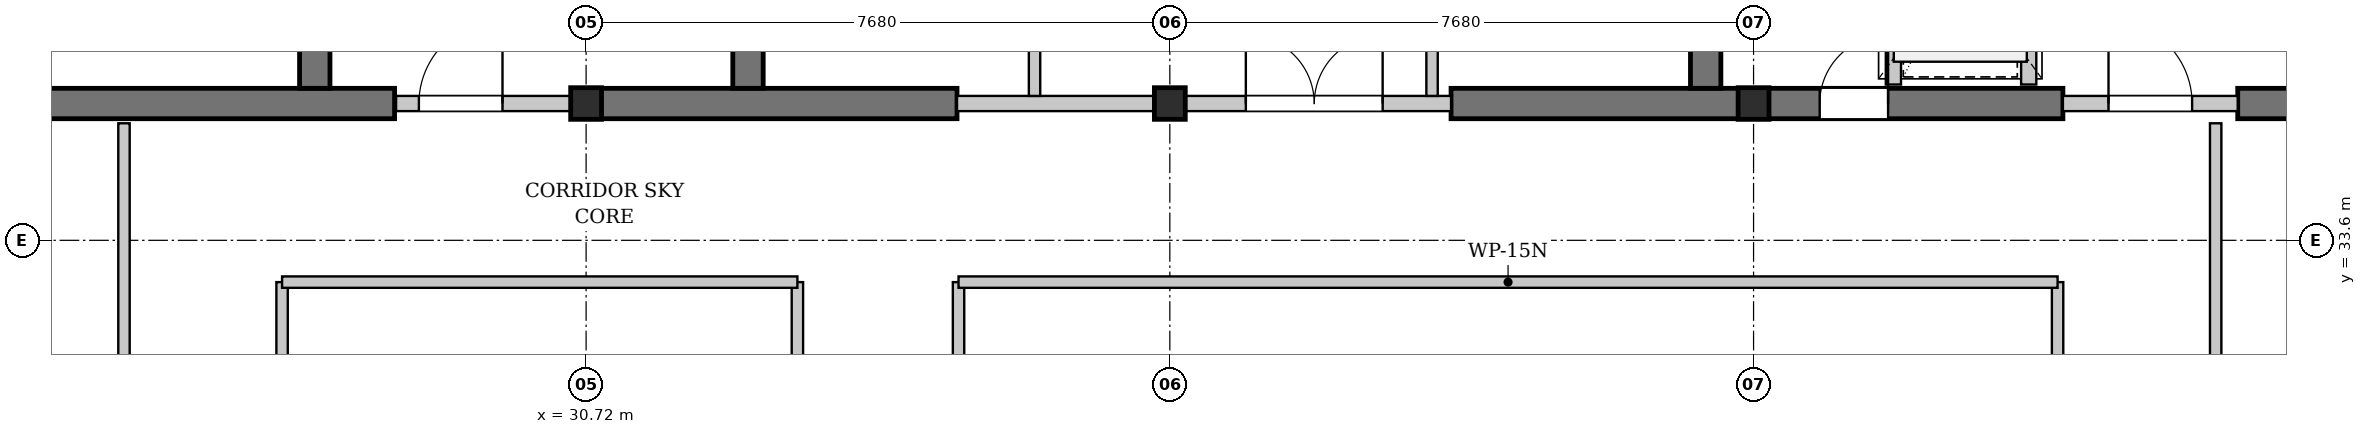
"""IFC4 building model, lengths in metres.
Left out: names, types, materials, properties, quantities, classifications, styles, units other than length and angle.
Written with IfcOpenShell. Run it as: python <this file> out.ifc"""

import sys

from ifc_helpers import new_model, si_unit, direction, frame, frame_2d, origin, origin_2d, place, context, subcontext, project, spatial, rectangle, i_section, extrude, element, fill, save


model = new_model("IFC4")
c1 = context("Model", 3, precision=1e-05, world=origin(), true_north=direction((0.0, 1.0)))
c2 = subcontext(c1, "Body", "Model", "MODEL_VIEW")
j1 = project(units=[si_unit("LENGTHUNIT", "METRE"), si_unit("PLANEANGLEUNIT", "RADIAN")], contexts=[c1])
p1 = place(None, origin())
s1 = spatial("IfcSite", under=j1, at=p1, CompositionType="ELEMENT")
p2 = place(p1, origin())
s2 = spatial("IfcBuilding", under=s1, at=p2, CompositionType="ELEMENT")
p3 = place(p2, frame((0.0, 0.0, 276.1)))
s3 = spatial("IfcBuildingStorey", under=s2, at=p3, CompositionType="ELEMENT", Elevation=276.1)
p4 = place(p3, frame((22.84, 35.4, 0.0), z_axis=(0.0, 0.0, 1.0), x_axis=(1.0, 0.0, 0.0)))
e1 = element("IfcWall", 1, at=p4, inside=s3, PredefinedType="SHEAR", context=c2, shape_type="SweptSolid", body=[
    extrude(rectangle(XDim=5.36, YDim=0.4, at=frame_2d((2.68, 0.0))), origin(), (0.0, 0.0, 1.0), 3.18),
])
p5 = place(p3, frame((30.72, 35.4, 0.0), z_axis=(0.0, 0.0, 1.0), x_axis=(1.0, 0.0, 0.0)))
e2 = element("IfcWall", 2, at=p5, inside=s3, PredefinedType="SHEAR", context=c2, shape_type="SweptSolid", body=[
    extrude(rectangle(XDim=4.88, YDim=0.4, at=frame_2d((2.44, 0.0))), origin(), (0.0, 0.0, 1.0), 3.18),
])
p6 = place(p3, frame((42.1, 35.4, 0.0), z_axis=(0.0, 0.0, 1.0), x_axis=(1.0, 0.0, 0.0)))
e3 = element("IfcWall", 3, at=p6, inside=s3, PredefinedType="SHEAR", context=c2, shape_type="SweptSolid", body=[
    extrude(rectangle(XDim=8.05, YDim=0.4, at=frame_2d((4.025, 0.0))), origin(), (0.0, 0.0, 1.0), 3.18),
])
p7 = place(p6, frame((4.85, 0.0, 0.0)))
e4 = element("IfcOpeningElement", 4, at=p7, cuts=e3, PredefinedType="OPENING", context=c2, shape_type="SweptSolid", body=[
    extrude(rectangle(XDim=0.9, YDim=2.15, at=frame_2d((0.45, 1.075))), frame((0.0, 0.21, 0.0), z_axis=(0.0, -1.0, 0.0), x_axis=(1.0, 0.0, 0.0)), (0.0, 0.0, 1.0), 0.42),
])
p8 = place(p3, frame((52.45, 35.4, 0.0), z_axis=(0.0, 0.0, 1.0), x_axis=(1.0, 0.0, 0.0)))
e5 = element("IfcWall", 5, at=p8, inside=s3, PredefinedType="SHEAR", context=c2, shape_type="SweptSolid", body=[
    extrude(rectangle(XDim=1.51, YDim=0.4, at=frame_2d((0.755, 0.0))), origin(), (0.0, 0.0, 1.0), 3.18),
])
p9 = place(p3, frame((27.15, 35.6, 0.0), z_axis=(0.0, 0.0, 1.0), x_axis=(0.0, 1.0, 0.0)))
e6 = element("IfcWall", 6, at=p9, inside=s3, PredefinedType="SHEAR", context=c2, shape_type="SweptSolid", body=[
    extrude(rectangle(XDim=10.4, YDim=0.4, at=frame_2d((5.2, 0.0))), origin(), (0.0, 0.0, 1.0), 3.18),
])
p10 = place(p9, frame((0.7, 0.0, 0.0)))
e7 = element("IfcOpeningElement", 7, at=p10, cuts=e6, PredefinedType="OPENING", context=c2, shape_type="SweptSolid", body=[
    extrude(rectangle(XDim=1.1, YDim=2.15, at=frame_2d((0.55, 1.075))), frame((0.0, 0.21, 0.0), z_axis=(0.0, -1.0, 0.0), x_axis=(1.0, 0.0, 0.0)), (0.0, 0.0, 1.0), 0.42),
])
for number, where, z_axis, x_axis in (
    (8, (32.85, 35.6, 0.0), (0.0, 0.0, 1.0), (0.0, 1.0, 0.0)),
    (9, (45.45, 35.6, 0.0), (0.0, 0.0, 1.0), (0.0, 1.0, 0.0)),
):
    element("IfcWall", number, at=place(p3, frame(where, z_axis=z_axis, x_axis=x_axis)), inside=s3, PredefinedType="SHEAR", context=c2, shape_type="SweptSolid", body=[
        extrude(rectangle(XDim=10.4, YDim=0.4, at=frame_2d((5.2, 0.0))), origin(), (0.0, 0.0, 1.0), 3.18),
    ])
for number, where, z_axis, x_axis in (
    (10, (30.72, 35.4, 0.0), (0.0, 0.0, 1.0), (1.0, 0.0, 0.0)),
    (11, (38.4, 35.4, 0.0), (0.0, 0.0, 1.0), (1.0, 0.0, 0.0)),
    (12, (46.08, 35.4, 0.0), (0.0, 0.0, 1.0), (1.0, 0.0, 0.0)),
):
    element("IfcColumn", number, at=place(p3, frame(where, z_axis=z_axis, x_axis=x_axis)), inside=s3, PredefinedType="COLUMN", context=c2, shape_type="SweptSolid", body=[
        extrude(i_section(OverallWidth=0.406, OverallDepth=0.416, WebThickness=0.03, FlangeThickness=0.048, FilletRadius=0.015, at=origin_2d()), origin(), (0.0, 0.0, 1.0), 3.4),
    ])
p11 = place(p3, frame((28.22, 35.4, 0.0), z_axis=(0.0, 0.0, 1.0), x_axis=(1.0, 0.0, 0.0)))
e13 = element("IfcWall", 13, at=p11, inside=s3, PredefinedType="PARTITIONING", context=c2, shape_type="SweptSolid", body=[
    extrude(rectangle(XDim=2.5, YDim=0.2, at=frame_2d((1.25, 0.0))), origin(), (0.0, 0.0, 1.0), 2.575),
])
p12 = place(p11, frame((0.3, 0.0, 0.0)))
e14 = element("IfcOpeningElement", 14, at=p12, cuts=e13, PredefinedType="OPENING", context=c2, shape_type="SweptSolid", body=[
    extrude(rectangle(XDim=1.1, YDim=2.15, at=frame_2d((0.55, 1.075))), frame((0.0, 0.11, 0.0), z_axis=(0.0, -1.0, 0.0), x_axis=(1.0, 0.0, 0.0)), (0.0, 0.0, 1.0), 0.22),
])
p13 = place(p3, frame((35.6, 35.4, 0.0), z_axis=(0.0, 0.0, 1.0), x_axis=(1.0, 0.0, 0.0)))
e15 = element("IfcWall", 15, at=p13, inside=s3, PredefinedType="PARTITIONING", context=c2, shape_type="SweptSolid", body=[
    extrude(rectangle(XDim=6.5, YDim=0.2, at=frame_2d((3.25, 0.0))), origin(), (0.0, 0.0, 1.0), 2.575),
])
p14 = place(p13, frame((3.8, 0.0, 0.0)))
e16 = element("IfcOpeningElement", 16, at=p14, cuts=e15, PredefinedType="OPENING", context=c2, shape_type="SweptSolid", body=[
    extrude(rectangle(XDim=1.8, YDim=2.3, at=frame_2d((0.9, 1.15))), frame((0.0, 0.11, 0.0), z_axis=(0.0, -1.0, 0.0), x_axis=(1.0, 0.0, 0.0)), (0.0, 0.0, 1.0), 0.22),
])
p15 = place(p3, frame((36.62, 35.5, 0.0), z_axis=(0.0, 0.0, 1.0), x_axis=(0.0, 1.0, 0.0)))
e17 = element("IfcWall", 17, at=p15, inside=s3, PredefinedType="PARTITIONING", context=c2, shape_type="SweptSolid", body=[
    extrude(rectangle(XDim=10.42, YDim=0.15, at=frame_2d((5.21, 0.0))), origin(), (0.0, 0.0, 1.0), 3.18),
])
p16 = place(p15, frame((3.92, 0.0, 0.0)))
e18 = element("IfcOpeningElement", 18, at=p16, cuts=e17, PredefinedType="OPENING", context=c2, shape_type="SweptSolid", body=[
    extrude(rectangle(XDim=0.9, YDim=2.15, at=frame_2d((0.45, 1.075))), frame((0.0, 0.085, 0.0), z_axis=(0.0, -1.0, 0.0), x_axis=(1.0, 0.0, 0.0)), (0.0, 0.0, 1.0), 0.17),
])
p17 = place(p15, frame((5.85, 0.0, 0.0)))
e19 = element("IfcOpeningElement", 19, at=p17, cuts=e17, PredefinedType="OPENING", context=c2, shape_type="SweptSolid", body=[
    extrude(rectangle(XDim=0.9, YDim=2.15, at=frame_2d((0.45, 1.075))), frame((0.0, 0.085, 0.0), z_axis=(0.0, -1.0, 0.0), x_axis=(1.0, 0.0, 0.0)), (0.0, 0.0, 1.0), 0.17),
])
p18 = place(p3, frame((41.85, 35.5, 0.0), z_axis=(0.0, 0.0, 1.0), x_axis=(0.0, 1.0, 0.0)))
e20 = element("IfcWall", 20, at=p18, inside=s3, PredefinedType="PARTITIONING", context=c2, shape_type="SweptSolid", body=[
    extrude(rectangle(XDim=10.42, YDim=0.15, at=frame_2d((5.21, 0.0))), origin(), (0.0, 0.0, 1.0), 3.18),
])
p19 = place(p18, frame((3.92, 0.0, 0.0)))
e21 = element("IfcOpeningElement", 21, at=p19, cuts=e20, PredefinedType="OPENING", context=c2, shape_type="SweptSolid", body=[
    extrude(rectangle(XDim=0.9, YDim=2.15, at=frame_2d((0.45, 1.075))), frame((0.0, 0.085, 0.0), z_axis=(0.0, -1.0, 0.0), x_axis=(1.0, 0.0, 0.0)), (0.0, 0.0, 1.0), 0.17),
])
p20 = place(p18, frame((5.85, 0.0, 0.0)))
e22 = element("IfcOpeningElement", 22, at=p20, cuts=e20, PredefinedType="OPENING", context=c2, shape_type="SweptSolid", body=[
    extrude(rectangle(XDim=0.9, YDim=2.15, at=frame_2d((0.45, 1.075))), frame((0.0, 0.085, 0.0), z_axis=(0.0, -1.0, 0.0), x_axis=(1.0, 0.0, 0.0)), (0.0, 0.0, 1.0), 0.17),
])
p21 = place(p3, frame((50.15, 35.4, 0.0), z_axis=(0.0, 0.0, 1.0), x_axis=(1.0, 0.0, 0.0)))
e23 = element("IfcWall", 23, at=p21, inside=s3, PredefinedType="PARTITIONING", context=c2, shape_type="SweptSolid", body=[
    extrude(rectangle(XDim=2.3, YDim=0.2, at=frame_2d((1.15, 0.0))), origin(), (0.0, 0.0, 1.0), 2.575),
])
p22 = place(p21, frame((0.6, 0.0, 0.0)))
e24 = element("IfcOpeningElement", 24, at=p22, cuts=e23, PredefinedType="OPENING", context=c2, shape_type="SweptSolid", body=[
    extrude(rectangle(XDim=1.1, YDim=2.15, at=frame_2d((0.55, 1.075))), frame((0.0, 0.11, 0.0), z_axis=(0.0, -1.0, 0.0), x_axis=(1.0, 0.0, 0.0)), (0.0, 0.0, 1.0), 0.22),
])
p23 = place(p3, frame((49.7, 35.65, 0.0), z_axis=(0.0, 0.0, 1.0), x_axis=(0.0, 1.0, 0.0)))
e25 = element("IfcWall", 25, at=p23, inside=s3, PredefinedType="PARTITIONING", context=c2, shape_type="SweptSolid", body=[
    extrude(rectangle(XDim=3.15, YDim=0.2, at=frame_2d((1.575, 0.0))), origin(), (0.0, 0.0, 1.0), 3.18),
])
p24 = place(p23, frame((0.85, 0.0, 0.0)))
e26 = element("IfcOpeningElement", 26, at=p24, cuts=e25, PredefinedType="OPENING", context=c2, shape_type="SweptSolid", body=[
    extrude(rectangle(XDim=1.2, YDim=2.2, at=frame_2d((0.6, 1.1))), frame((0.0, 0.11, 0.0), z_axis=(0.0, -1.0, 0.0), x_axis=(1.0, 0.0, 0.0)), (0.0, 0.0, 1.0), 0.22),
])
p25 = place(p3, frame((47.92, 35.65, 0.0), z_axis=(0.0, 0.0, 1.0), x_axis=(0.0, 1.0, 0.0)))
e27 = element("IfcWall", 27, at=p25, inside=s3, PredefinedType="PARTITIONING", context=c2, shape_type="SweptSolid", body=[
    extrude(rectangle(XDim=3.15, YDim=0.2, at=frame_2d((1.575, 0.0))), origin(), (0.0, 0.0, 1.0), 3.18),
])
p26 = place(p3, frame((24.64, 21.85, 0.0), z_axis=(0.0, 0.0, 1.0), x_axis=(0.0, 1.0, 0.0)))
e28 = element("IfcWall", 28, at=p26, inside=s3, PredefinedType="PARTITIONING", context=c2, shape_type="SweptSolid", body=[
    extrude(rectangle(XDim=13.29, YDim=0.15, at=frame_2d((6.645, 0.0))), origin(), (0.0, 0.0, 1.0), 3.18),
])
p27 = place(p26, frame((0.984, 0.0, 0.0)))
e29 = element("IfcOpeningElement", 29, at=p27, cuts=e28, PredefinedType="OPENING", context=c2, shape_type="SweptSolid", body=[
    extrude(rectangle(XDim=0.9, YDim=2.15, at=frame_2d((0.45, 1.075))), frame((0.0, 0.085, 0.0), z_axis=(0.0, -1.0, 0.0), x_axis=(1.0, 0.0, 0.0)), (0.0, 0.0, 1.0), 0.17),
])
p28 = place(p3, frame((52.16, 21.85, 0.0), z_axis=(0.0, 0.0, 1.0), x_axis=(0.0, 1.0, 0.0)))
e30 = element("IfcWall", 30, at=p28, inside=s3, PredefinedType="PARTITIONING", context=c2, shape_type="SweptSolid", body=[
    extrude(rectangle(XDim=13.29, YDim=0.15, at=frame_2d((6.645, 0.0))), origin(), (0.0, 0.0, 1.0), 3.18),
])
p29 = place(p28, frame((0.984, 0.0, 0.0)))
e31 = element("IfcOpeningElement", 31, at=p29, cuts=e30, PredefinedType="OPENING", context=c2, shape_type="SweptSolid", body=[
    extrude(rectangle(XDim=0.9, YDim=2.15, at=frame_2d((0.45, 1.075))), frame((0.0, 0.085, 0.0), z_axis=(0.0, -1.0, 0.0), x_axis=(1.0, 0.0, 0.0)), (0.0, 0.0, 1.0), 0.17),
])
for number, where, z_axis, x_axis in (
    (32, (26.72, 23.93, 0.0), (0.0, 0.0, 1.0), (0.0, 1.0, 0.0)),
    (33, (50.08, 23.93, 0.0), (0.0, 0.0, 1.0), (0.0, 1.0, 0.0)),
    (34, (33.5, 23.93, 0.0), (0.0, 0.0, 1.0), (0.0, 1.0, 0.0)),
    (35, (35.62, 23.93, 0.0), (0.0, 0.0, 1.0), (0.0, 1.0, 0.0)),
):
    element("IfcWall", number, at=place(p3, frame(where, z_axis=z_axis, x_axis=x_axis)), inside=s3, PredefinedType="PARTITIONING", context=c2, shape_type="SweptSolid", body=[
        extrude(rectangle(XDim=9.12, YDim=0.15, at=frame_2d((4.56, 0.0))), origin(), (0.0, 0.0, 1.0), 3.18),
    ])
p30 = place(p3, frame((26.72, 33.05, 0.0), z_axis=(0.0, 0.0, 1.0), x_axis=(1.0, 0.0, 0.0)))
e36 = element("IfcWall", 36, at=p30, inside=s3, PredefinedType="PARTITIONING", context=c2, shape_type="SweptSolid", body=[
    extrude(rectangle(XDim=6.78, YDim=0.15, at=frame_2d((3.39, 0.0))), origin(), (0.0, 0.0, 1.0), 3.18),
])
p31 = place(p3, frame((35.62, 33.05, 0.0), z_axis=(0.0, 0.0, 1.0), x_axis=(1.0, 0.0, 0.0)))
e37 = element("IfcWall", 37, at=p31, inside=s3, PredefinedType="PARTITIONING", context=c2, shape_type="SweptSolid", body=[
    extrude(rectangle(XDim=14.46, YDim=0.15, at=frame_2d((7.23, 0.0))), origin(), (0.0, 0.0, 1.0), 3.18),
])
p32 = place(p12, origin())
e38 = element("IfcDoor", 38, at=p32, inside=s3, OperationType="SINGLE_SWING_RIGHT", PredefinedType="DOOR", context=c2, shape_type="SweptSolid", body=[
    extrude(rectangle(XDim=1.1, YDim=2.15, at=frame_2d((0.55, 1.075))), frame((0.0, 0.025, 0.0), z_axis=(0.0, -1.0, 0.0), x_axis=(1.0, 0.0, 0.0)), (0.0, 0.0, 1.0), 0.05),
])
fill(e14, e38)
p33 = place(p14, origin())
e39 = element("IfcDoor", 39, at=p33, inside=s3, OperationType="DOUBLE_DOOR_SINGLE_SWING", PredefinedType="DOOR", context=c2, shape_type="SweptSolid", body=[
    extrude(rectangle(XDim=1.8, YDim=2.3, at=frame_2d((0.9, 1.15))), frame((0.0, 0.025, 0.0), z_axis=(0.0, -1.0, 0.0), x_axis=(1.0, 0.0, 0.0)), (0.0, 0.0, 1.0), 0.05),
])
fill(e16, e39)
p34 = place(p22, origin())
e40 = element("IfcDoor", 40, at=p34, inside=s3, OperationType="SINGLE_SWING_LEFT", PredefinedType="DOOR", context=c2, shape_type="SweptSolid", body=[
    extrude(rectangle(XDim=1.1, YDim=2.15, at=frame_2d((0.55, 1.075))), frame((0.0, 0.025, 0.0), z_axis=(0.0, -1.0, 0.0), x_axis=(1.0, 0.0, 0.0)), (0.0, 0.0, 1.0), 0.05),
])
fill(e24, e40)
p35 = place(p7, origin())
e41 = element("IfcDoor", 41, at=p35, inside=s3, OperationType="SINGLE_SWING_RIGHT", PredefinedType="DOOR", context=c2, shape_type="SweptSolid", body=[
    extrude(rectangle(XDim=0.9, YDim=2.15, at=frame_2d((0.45, 1.075))), frame((0.0, 0.025, 0.0), z_axis=(0.0, -1.0, 0.0), x_axis=(1.0, 0.0, 0.0)), (0.0, 0.0, 1.0), 0.05),
])
fill(e4, e41)
save(model, sys.argv[1])
